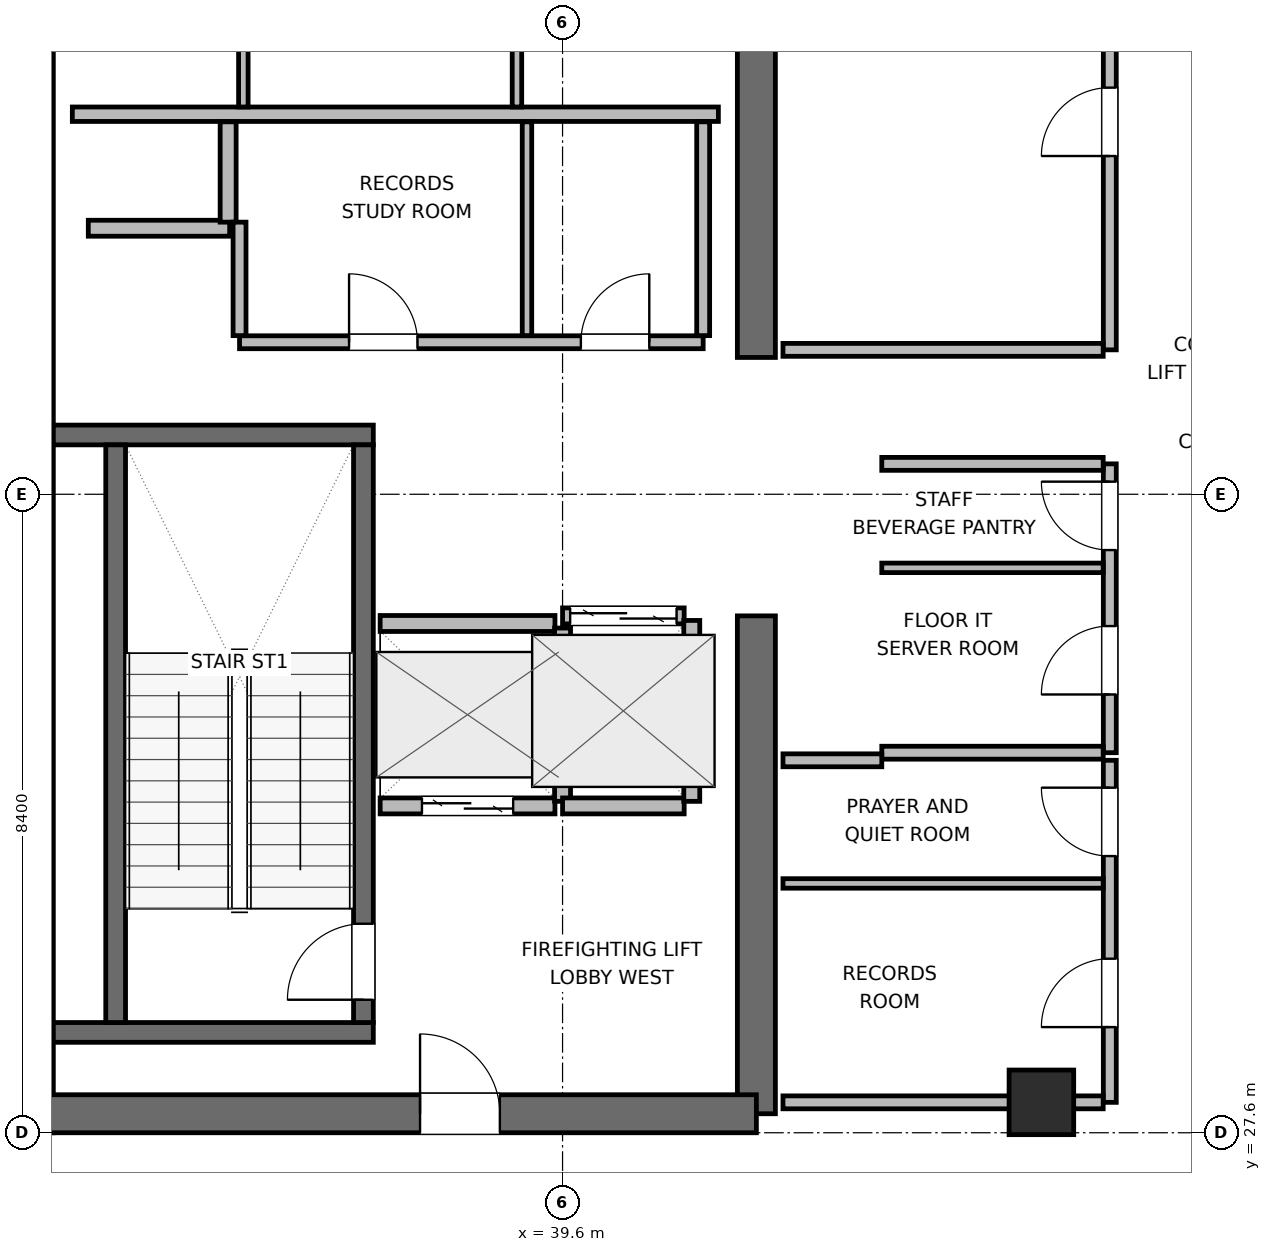
"""IFC4 building model, lengths in metres.
Left out: names, types, materials, properties, quantities, classifications, styles, units other than length and angle.
Written with IfcOpenShell. Run it as: python <this file> out.ifc"""

import sys

from ifc_helpers import new_model, si_unit, direction, frame, frame_2d, origin, origin_2d, place, context, subcontext, project, spatial, rectangle, extrude, element, fill, save


model = new_model("IFC4")
c1 = context("Model", 3, precision=1e-05, world=origin(), true_north=direction((0.0, 1.0)))
c2 = subcontext(c1, "Body", "Model", "MODEL_VIEW")
j1 = project(units=[si_unit("LENGTHUNIT", "METRE"), si_unit("PLANEANGLEUNIT", "RADIAN")], contexts=[c1])
p1 = place(None, origin())
s1 = spatial("IfcSite", under=j1, at=p1, CompositionType="ELEMENT")
p2 = place(p1, origin())
s2 = spatial("IfcBuilding", under=s1, at=p2, CompositionType="ELEMENT")
p3 = place(p2, frame((0.0, 0.0, 337.5)))
s3 = spatial("IfcBuildingStorey", under=s2, at=p3, CompositionType="ELEMENT", Elevation=337.5)
p4 = place(p3, frame((32.65, 27.6, 0.0), z_axis=(0.0, 0.0, 1.0), x_axis=(0.0, 1.0, 0.0)))
e1 = element("IfcWall", 1, at=p4, inside=s3, PredefinedType="SHEAR", context=c2, shape_type="SweptSolid", body=[
    extrude(rectangle(XDim=16.8, YDim=0.5, at=frame_2d((8.4, 0.0))), origin(), (0.0, 0.0, 1.0), 4.5),
])
p5 = place(p3, frame((42.15, 27.85, 0.0), z_axis=(0.0, 0.0, 1.0), x_axis=(0.0, 1.0, 0.0)))
e2 = element("IfcWall", 2, at=p5, inside=s3, PredefinedType="SHEAR", context=c2, shape_type="SweptSolid", body=[
    extrude(rectangle(XDim=6.55, YDim=0.5, at=frame_2d((3.275, 0.0))), origin(), (0.0, 0.0, 1.0), 4.5),
])
p6 = place(p3, frame((42.15, 37.8, 0.0), z_axis=(0.0, 0.0, 1.0), x_axis=(0.0, 1.0, 0.0)))
e3 = element("IfcWall", 3, at=p6, inside=s3, PredefinedType="SHEAR", context=c2, shape_type="SweptSolid", body=[
    extrude(rectangle(XDim=6.35, YDim=0.5, at=frame_2d((3.175, 0.0))), origin(), (0.0, 0.0, 1.0), 4.5),
])
p7 = place(p3, frame((32.65, 27.85, 0.0), z_axis=(0.0, 0.0, 1.0), x_axis=(1.0, 0.0, 0.0)))
e4 = element("IfcWall", 4, at=p7, inside=s3, PredefinedType="SHEAR", context=c2, shape_type="SweptSolid", body=[
    extrude(rectangle(XDim=9.5, YDim=0.5, at=frame_2d((4.75, 0.0))), origin(), (0.0, 0.0, 1.0), 4.5),
])
p8 = place(p7, frame((5.075, 0.0, 0.0)))
e5 = element("IfcOpeningElement", 5, at=p8, cuts=e4, PredefinedType="OPENING", context=c2, shape_type="SweptSolid", body=[
    extrude(rectangle(XDim=1.05, YDim=2.04, at=frame_2d((0.525, 1.02))), frame((0.0, 0.26, 0.0), z_axis=(0.0, -1.0, 0.0), x_axis=(1.0, 0.0, 0.0)), (0.0, 0.0, 1.0), 0.52),
])
for number, where, z_axis, x_axis in (
    (6, (32.9, 28.92, 0.0), (0.0, 0.0, 1.0), (1.0, 0.0, 0.0)),
    (7, (32.9, 36.78, 0.0), (0.0, 0.0, 1.0), (1.0, 0.0, 0.0)),
):
    element("IfcWall", number, at=place(p3, frame(where, z_axis=z_axis, x_axis=x_axis)), inside=s3, PredefinedType="SHEAR", context=c2, shape_type="SweptSolid", body=[
        extrude(rectangle(XDim=4.21, YDim=0.26, at=frame_2d((2.105, 0.0))), origin(), (0.0, 0.0, 1.0), 4.5),
    ])
p9 = place(p3, frame((33.72, 29.05, 0.0), z_axis=(0.0, 0.0, 1.0), x_axis=(0.0, 1.0, 0.0)))
e8 = element("IfcWall", 8, at=p9, inside=s3, PredefinedType="SHEAR", context=c2, shape_type="SweptSolid", body=[
    extrude(rectangle(XDim=7.6, YDim=0.26, at=frame_2d((3.8, 0.0))), origin(), (0.0, 0.0, 1.0), 4.5),
])
p10 = place(p3, frame((36.98, 29.05, 0.0), z_axis=(0.0, 0.0, 1.0), x_axis=(0.0, 1.0, 0.0)))
e9 = element("IfcWall", 9, at=p10, inside=s3, PredefinedType="SHEAR", context=c2, shape_type="SweptSolid", body=[
    extrude(rectangle(XDim=7.6, YDim=0.26, at=frame_2d((3.8, 0.0))), origin(), (0.0, 0.0, 1.0), 4.5),
])
p11 = place(p10, frame((0.3, 0.0, 0.0)))
e10 = element("IfcOpeningElement", 10, at=p11, cuts=e9, PredefinedType="OPENING", context=c2, shape_type="SweptSolid", body=[
    extrude(rectangle(XDim=1.0, YDim=2.04, at=frame_2d((0.5, 1.02))), frame((0.0, 0.14, 0.0), z_axis=(0.0, -1.0, 0.0), x_axis=(1.0, 0.0, 0.0)), (0.0, 0.0, 1.0), 0.28),
])
p12 = place(p3, frame((45.9, 28.0, 0.0), z_axis=(0.0, 0.0, 1.0), x_axis=(1.0, 0.0, 0.0)))
e11 = element("IfcColumn", 11, at=p12, inside=s3, PredefinedType="COLUMN", context=c2, shape_type="SweptSolid", body=[
    extrude(rectangle(XDim=0.85, YDim=0.85, at=origin_2d()), origin(), (0.0, 0.0, 1.0), 4.5),
])
p13 = place(p3, frame((33.15, 41.0, 0.0), z_axis=(0.0, 0.0, 1.0), x_axis=(1.0, 0.0, 0.0)))
e12 = element("IfcWall", 12, at=p13, inside=s3, PredefinedType="PLUMBINGWALL", context=c2, shape_type="SweptSolid", body=[
    extrude(rectangle(XDim=8.5, YDim=0.19, at=frame_2d((4.25, 0.0))), origin(), (0.0, 0.0, 1.0), 4.28),
])
for number, where, z_axis, x_axis in (
    (13, (35.4, 41.095, 0.0), (0.0, 0.0, 1.0), (0.0, 1.0, 0.0)),
    (14, (39.0, 41.095, 0.0), (0.0, 0.0, 1.0), (0.0, 1.0, 0.0)),
):
    element("IfcWall", number, at=place(p3, frame(where, z_axis=z_axis, x_axis=x_axis)), inside=s3, PredefinedType="PARTITIONING", context=c2, shape_type="SweptSolid", body=[
        extrude(rectangle(XDim=2.555, YDim=0.125, at=frame_2d((1.277, 0.0))), origin(), (0.0, 0.0, 1.0), 4.28),
    ])
p14 = place(p3, frame((33.36, 39.5, 0.0), z_axis=(0.0, 0.0, 1.0), x_axis=(1.0, 0.0, 0.0)))
e15 = element("IfcWall", 15, at=p14, inside=s3, PredefinedType="PARTITIONING", context=c2, shape_type="SweptSolid", body=[
    extrude(rectangle(XDim=1.86, YDim=0.21, at=frame_2d((0.93, 0.0))), origin(), (0.0, 0.0, 1.0), 4.28),
])
p15 = place(p3, frame((35.2, 39.58, 0.0), z_axis=(0.0, 0.0, 1.0), x_axis=(0.0, 1.0, 0.0)))
e16 = element("IfcWall", 16, at=p15, inside=s3, PredefinedType="PARTITIONING", context=c2, shape_type="SweptSolid", body=[
    extrude(rectangle(XDim=1.32, YDim=0.21, at=frame_2d((0.66, 0.0))), origin(), (0.0, 0.0, 1.0), 4.28),
])
p16 = place(p3, frame((37.2, 31.9, 0.0), z_axis=(0.0, 0.0, 1.0), x_axis=(1.0, 0.0, 0.0)))
e17 = element("IfcWall", 17, at=p16, inside=s3, PredefinedType="PARTITIONING", context=c2, shape_type="SweptSolid", body=[
    extrude(rectangle(XDim=2.3, YDim=0.21, at=frame_2d((1.15, 0.0))), origin(), (0.0, 0.0, 1.0), 4.28),
])
p17 = place(p16, frame((0.55, 0.0, 0.0)))
e18 = element("IfcOpeningElement", 18, at=p17, cuts=e17, PredefinedType="OPENING", context=c2, shape_type="SweptSolid", body=[
    extrude(rectangle(XDim=1.2, YDim=2.04, at=frame_2d((0.6, 1.02))), frame((0.0, 0.115, 0.0), z_axis=(0.0, -1.0, 0.0), x_axis=(1.0, 0.0, 0.0)), (0.0, 0.0, 1.0), 0.23),
])
p18 = place(p3, frame((37.2, 34.3, 0.0), z_axis=(0.0, 0.0, 1.0), x_axis=(1.0, 0.0, 0.0)))
e19 = element("IfcWall", 19, at=p18, inside=s3, PredefinedType="PARTITIONING", context=c2, shape_type="SweptSolid", body=[
    extrude(rectangle(XDim=2.3, YDim=0.21, at=frame_2d((1.15, 0.0))), origin(), (0.0, 0.0, 1.0), 4.28),
])
p19 = place(p3, frame((39.6, 31.96, 0.0), z_axis=(0.0, 0.0, 1.0), x_axis=(0.0, 1.0, 0.0)))
e20 = element("IfcWall", 20, at=p19, inside=s3, PredefinedType="PARTITIONING", context=c2, shape_type="SweptSolid", body=[
    extrude(rectangle(XDim=2.28, YDim=0.21, at=frame_2d((1.14, 0.0))), origin(), (0.0, 0.0, 1.0), 4.28),
])
p20 = place(p3, frame((39.6, 34.4, 0.0), z_axis=(0.0, 0.0, 1.0), x_axis=(1.0, 0.0, 0.0)))
e21 = element("IfcWall", 21, at=p20, inside=s3, PredefinedType="PARTITIONING", context=c2, shape_type="SweptSolid", body=[
    extrude(rectangle(XDim=1.6, YDim=0.21, at=frame_2d((0.8, 0.0))), origin(), (0.0, 0.0, 1.0), 4.28),
])
p21 = place(p20, frame((0.1, 0.0, 0.0)))
e22 = element("IfcOpeningElement", 22, at=p21, cuts=e21, PredefinedType="OPENING", context=c2, shape_type="SweptSolid", body=[
    extrude(rectangle(XDim=1.4, YDim=2.06, at=frame_2d((0.7, 1.03))), frame((0.0, 0.115, 0.0), z_axis=(0.0, -1.0, 0.0), x_axis=(1.0, 0.0, 0.0)), (0.0, 0.0, 1.0), 0.23),
])
p22 = place(p3, frame((39.6, 31.9, 0.0), z_axis=(0.0, 0.0, 1.0), x_axis=(1.0, 0.0, 0.0)))
e23 = element("IfcWall", 23, at=p22, inside=s3, PredefinedType="PARTITIONING", context=c2, shape_type="SweptSolid", body=[
    extrude(rectangle(XDim=1.6, YDim=0.21, at=frame_2d((0.8, 0.0))), origin(), (0.0, 0.0, 1.0), 4.28),
])
p23 = place(p3, frame((41.3, 31.96, 0.0), z_axis=(0.0, 0.0, 1.0), x_axis=(0.0, 1.0, 0.0)))
e24 = element("IfcWall", 24, at=p23, inside=s3, PredefinedType="PARTITIONING", context=c2, shape_type="SweptSolid", body=[
    extrude(rectangle(XDim=2.38, YDim=0.21, at=frame_2d((1.19, 0.0))), origin(), (0.0, 0.0, 1.0), 4.28),
])
p24 = place(p3, frame((35.35, 38.0, 0.0), z_axis=(0.0, 0.0, 1.0), x_axis=(1.0, 0.0, 0.0)))
e25 = element("IfcWall", 25, at=p24, inside=s3, PredefinedType="PARTITIONING", context=c2, shape_type="SweptSolid", body=[
    extrude(rectangle(XDim=6.1, YDim=0.17, at=frame_2d((3.05, 0.0))), origin(), (0.0, 0.0, 1.0), 4.28),
])
p25 = place(p24, frame((1.441, 0.0, 0.0)))
e26 = element("IfcOpeningElement", 26, at=p25, cuts=e25, PredefinedType="OPENING", context=c2, shape_type="SweptSolid", body=[
    extrude(rectangle(XDim=0.9, YDim=2.02, at=frame_2d((0.45, 1.01))), frame((0.0, 0.095, 0.0), z_axis=(0.0, -1.0, 0.0), x_axis=(1.0, 0.0, 0.0)), (0.0, 0.0, 1.0), 0.19),
])
p26 = place(p24, frame((4.491, 0.0, 0.0)))
e27 = element("IfcOpeningElement", 27, at=p26, cuts=e25, PredefinedType="OPENING", context=c2, shape_type="SweptSolid", body=[
    extrude(rectangle(XDim=0.9, YDim=2.02, at=frame_2d((0.45, 1.01))), frame((0.0, 0.095, 0.0), z_axis=(0.0, -1.0, 0.0), x_axis=(1.0, 0.0, 0.0)), (0.0, 0.0, 1.0), 0.19),
])
p27 = place(p3, frame((35.35, 38.087, 0.0), z_axis=(0.0, 0.0, 1.0), x_axis=(0.0, 1.0, 0.0)))
e28 = element("IfcWall", 28, at=p27, inside=s3, PredefinedType="PARTITIONING", context=c2, shape_type="SweptSolid", body=[
    extrude(rectangle(XDim=1.493, YDim=0.17, at=frame_2d((0.747, 0.0))), origin(), (0.0, 0.0, 1.0), 4.28),
])
p28 = place(p3, frame((41.45, 38.087, 0.0), z_axis=(0.0, 0.0, 1.0), x_axis=(0.0, 1.0, 0.0)))
e29 = element("IfcWall", 29, at=p28, inside=s3, PredefinedType="PARTITIONING", context=c2, shape_type="SweptSolid", body=[
    extrude(rectangle(XDim=2.813, YDim=0.17, at=frame_2d((1.406, 0.0))), origin(), (0.0, 0.0, 1.0), 4.28),
])
p29 = place(p3, frame((39.132, 38.087, 0.0), z_axis=(0.0, 0.0, 1.0), x_axis=(0.0, 1.0, 0.0)))
e30 = element("IfcWall", 30, at=p29, inside=s3, PredefinedType="PARTITIONING", context=c2, shape_type="SweptSolid", body=[
    extrude(rectangle(XDim=2.813, YDim=0.125, at=frame_2d((1.406, 0.0))), origin(), (0.0, 0.0, 1.0), 4.28),
])
p30 = place(p3, frame((46.8, 32.6, 0.0), z_axis=(0.0, 0.0, 1.0), x_axis=(0.0, 1.0, 0.0)))
e31 = element("IfcWall", 31, at=p30, inside=s3, PredefinedType="PARTITIONING", context=c2, shape_type="SweptSolid", body=[
    extrude(rectangle(XDim=3.8, YDim=0.17, at=frame_2d((1.9, 0.0))), origin(), (0.0, 0.0, 1.0), 4.28),
])
p31 = place(p30, frame((0.766, 0.0, 0.0)))
e32 = element("IfcOpeningElement", 32, at=p31, cuts=e31, PredefinedType="OPENING", context=c2, shape_type="SweptSolid", body=[
    extrude(rectangle(XDim=0.9, YDim=2.02, at=frame_2d((0.45, 1.01))), frame((0.0, 0.095, 0.0), z_axis=(0.0, -1.0, 0.0), x_axis=(1.0, 0.0, 0.0)), (0.0, 0.0, 1.0), 0.19),
])
p32 = place(p30, frame((2.666, 0.0, 0.0)))
e33 = element("IfcOpeningElement", 33, at=p32, cuts=e31, PredefinedType="OPENING", context=c2, shape_type="SweptSolid", body=[
    extrude(rectangle(XDim=0.9, YDim=2.02, at=frame_2d((0.45, 1.01))), frame((0.0, 0.095, 0.0), z_axis=(0.0, -1.0, 0.0), x_axis=(1.0, 0.0, 0.0)), (0.0, 0.0, 1.0), 0.19),
])
for number, where, z_axis, x_axis in (
    (34, (43.8, 32.6, 0.0), (0.0, 0.0, 1.0), (1.0, 0.0, 0.0)),
    (35, (43.8, 36.4, 0.0), (0.0, 0.0, 1.0), (1.0, 0.0, 0.0)),
):
    element("IfcWall", number, at=place(p3, frame(where, z_axis=z_axis, x_axis=x_axis)), inside=s3, PredefinedType="PARTITIONING", context=c2, shape_type="SweptSolid", body=[
        extrude(rectangle(XDim=2.913, YDim=0.17, at=frame_2d((1.457, 0.0))), origin(), (0.0, 0.0, 1.0), 4.28),
    ])
p33 = place(p3, frame((43.8, 35.032, 0.0), z_axis=(0.0, 0.0, 1.0), x_axis=(1.0, 0.0, 0.0)))
e36 = element("IfcWall", 36, at=p33, inside=s3, PredefinedType="PARTITIONING", context=c2, shape_type="SweptSolid", body=[
    extrude(rectangle(XDim=2.913, YDim=0.125, at=frame_2d((1.457, 0.0))), origin(), (0.0, 0.0, 1.0), 4.28),
])
p34 = place(p3, frame((46.8, 28.0, 0.0), z_axis=(0.0, 0.0, 1.0), x_axis=(0.0, 1.0, 0.0)))
e37 = element("IfcWall", 37, at=p34, inside=s3, PredefinedType="PARTITIONING", context=c2, shape_type="SweptSolid", body=[
    extrude(rectangle(XDim=4.5, YDim=0.17, at=frame_2d((2.25, 0.0))), origin(), (0.0, 0.0, 1.0), 4.28),
])
p35 = place(p34, frame((0.99, 0.0, 0.0)))
e38 = element("IfcOpeningElement", 38, at=p35, cuts=e37, PredefinedType="OPENING", context=c2, shape_type="SweptSolid", body=[
    extrude(rectangle(XDim=0.9, YDim=2.02, at=frame_2d((0.45, 1.01))), frame((0.0, 0.095, 0.0), z_axis=(0.0, -1.0, 0.0), x_axis=(1.0, 0.0, 0.0)), (0.0, 0.0, 1.0), 0.19),
])
p36 = place(p34, frame((3.24, 0.0, 0.0)))
e39 = element("IfcOpeningElement", 39, at=p36, cuts=e37, PredefinedType="OPENING", context=c2, shape_type="SweptSolid", body=[
    extrude(rectangle(XDim=0.9, YDim=2.02, at=frame_2d((0.45, 1.01))), frame((0.0, 0.095, 0.0), z_axis=(0.0, -1.0, 0.0), x_axis=(1.0, 0.0, 0.0)), (0.0, 0.0, 1.0), 0.19),
])
p37 = place(p3, frame((42.5, 28.0, 0.0), z_axis=(0.0, 0.0, 1.0), x_axis=(1.0, 0.0, 0.0)))
e40 = element("IfcWall", 40, at=p37, inside=s3, PredefinedType="PARTITIONING", context=c2, shape_type="SweptSolid", body=[
    extrude(rectangle(XDim=4.213, YDim=0.17, at=frame_2d((2.106, 0.0))), origin(), (0.0, 0.0, 1.0), 3.365),
])
p38 = place(p3, frame((42.5, 32.5, 0.0), z_axis=(0.0, 0.0, 1.0), x_axis=(1.0, 0.0, 0.0)))
e41 = element("IfcWall", 41, at=p38, inside=s3, PredefinedType="PARTITIONING", context=c2, shape_type="SweptSolid", body=[
    extrude(rectangle(XDim=1.3, YDim=0.17, at=frame_2d((0.65, 0.0))), origin(), (0.0, 0.0, 1.0), 4.28),
])
p39 = place(p3, frame((42.5, 30.88, 0.0), z_axis=(0.0, 0.0, 1.0), x_axis=(1.0, 0.0, 0.0)))
e42 = element("IfcWall", 42, at=p39, inside=s3, PredefinedType="PARTITIONING", context=c2, shape_type="SweptSolid", body=[
    extrude(rectangle(XDim=4.213, YDim=0.125, at=frame_2d((2.106, 0.0))), origin(), (0.0, 0.0, 1.0), 4.28),
])
p40 = place(p3, frame((46.8, 37.9, 0.0), z_axis=(0.0, 0.0, 1.0), x_axis=(0.0, 1.0, 0.0)))
e43 = element("IfcWall", 43, at=p40, inside=s3, PredefinedType="PARTITIONING", context=c2, shape_type="SweptSolid", body=[
    extrude(rectangle(XDim=6.0, YDim=0.17, at=frame_2d((3.0, 0.0))), origin(), (0.0, 0.0, 1.0), 4.28),
])
p41 = place(p40, frame((2.55, 0.0, 0.0)))
e44 = element("IfcOpeningElement", 44, at=p41, cuts=e43, PredefinedType="OPENING", context=c2, shape_type="SweptSolid", body=[
    extrude(rectangle(XDim=0.9, YDim=2.02, at=frame_2d((0.45, 1.01))), frame((0.0, 0.095, 0.0), z_axis=(0.0, -1.0, 0.0), x_axis=(1.0, 0.0, 0.0)), (0.0, 0.0, 1.0), 0.19),
])
p42 = place(p3, frame((42.5, 37.9, 0.0), z_axis=(0.0, 0.0, 1.0), x_axis=(1.0, 0.0, 0.0)))
e45 = element("IfcWall", 45, at=p42, inside=s3, PredefinedType="PARTITIONING", context=c2, shape_type="SweptSolid", body=[
    extrude(rectangle(XDim=4.213, YDim=0.17, at=frame_2d((2.106, 0.0))), origin(), (0.0, 0.0, 1.0), 4.28),
])
p43 = place(p11, origin())
e46 = element("IfcDoor", 46, at=p43, inside=s3, OperationType="SINGLE_SWING_LEFT", PredefinedType="DOOR", context=c2, shape_type="SweptSolid", body=[
    extrude(rectangle(XDim=1.0, YDim=2.04, at=frame_2d((0.5, 1.02))), frame((0.0, 0.025, 0.0), z_axis=(0.0, -1.0, 0.0), x_axis=(1.0, 0.0, 0.0)), (0.0, 0.0, 1.0), 0.05),
])
fill(e10, e46)
p44 = place(p17, origin())
e47 = element("IfcDoor", 47, at=p44, inside=s3, OperationType="DOUBLE_DOOR_SLIDING", PredefinedType="DOOR", context=c2, shape_type="SweptSolid", body=[
    extrude(rectangle(XDim=1.2, YDim=2.04, at=frame_2d((0.6, 1.02))), frame((0.0, 0.025, 0.0), z_axis=(0.0, -1.0, 0.0), x_axis=(1.0, 0.0, 0.0)), (0.0, 0.0, 1.0), 0.05),
])
fill(e18, e47)
p45 = place(p21, origin())
e48 = element("IfcDoor", 48, at=p45, inside=s3, OperationType="DOUBLE_DOOR_SLIDING", PredefinedType="DOOR", context=c2, shape_type="SweptSolid", body=[
    extrude(rectangle(XDim=1.4, YDim=2.06, at=frame_2d((0.7, 1.03))), frame((0.0, 0.025, 0.0), z_axis=(0.0, -1.0, 0.0), x_axis=(1.0, 0.0, 0.0)), (0.0, 0.0, 1.0), 0.05),
])
fill(e22, e48)
p46 = place(p8, origin())
e49 = element("IfcDoor", 49, at=p46, inside=s3, OperationType="SINGLE_SWING_LEFT", PredefinedType="DOOR", context=c2, shape_type="SweptSolid", body=[
    extrude(rectangle(XDim=1.05, YDim=2.04, at=frame_2d((0.525, 1.02))), frame((0.0, 0.025, 0.0), z_axis=(0.0, -1.0, 0.0), x_axis=(1.0, 0.0, 0.0)), (0.0, 0.0, 1.0), 0.05),
])
fill(e5, e49)
p47 = place(p25, origin())
e50 = element("IfcDoor", 50, at=p47, inside=s3, OperationType="SINGLE_SWING_LEFT", PredefinedType="DOOR", context=c2, shape_type="SweptSolid", body=[
    extrude(rectangle(XDim=0.9, YDim=2.02, at=frame_2d((0.45, 1.01))), frame((0.0, 0.025, 0.0), z_axis=(0.0, -1.0, 0.0), x_axis=(1.0, 0.0, 0.0)), (0.0, 0.0, 1.0), 0.05),
])
fill(e26, e50)
p48 = place(p26, origin())
e51 = element("IfcDoor", 51, at=p48, inside=s3, OperationType="SINGLE_SWING_RIGHT", PredefinedType="DOOR", context=c2, shape_type="SweptSolid", body=[
    extrude(rectangle(XDim=0.9, YDim=2.02, at=frame_2d((0.45, 1.01))), frame((0.0, 0.025, 0.0), z_axis=(0.0, -1.0, 0.0), x_axis=(1.0, 0.0, 0.0)), (0.0, 0.0, 1.0), 0.05),
])
fill(e27, e51)
p49 = place(p31, origin())
e52 = element("IfcDoor", 52, at=p49, inside=s3, OperationType="SINGLE_SWING_LEFT", PredefinedType="DOOR", context=c2, shape_type="SweptSolid", body=[
    extrude(rectangle(XDim=0.9, YDim=2.02, at=frame_2d((0.45, 1.01))), frame((0.0, 0.025, 0.0), z_axis=(0.0, -1.0, 0.0), x_axis=(1.0, 0.0, 0.0)), (0.0, 0.0, 1.0), 0.05),
])
fill(e32, e52)
p50 = place(p32, origin())
e53 = element("IfcDoor", 53, at=p50, inside=s3, OperationType="SINGLE_SWING_RIGHT", PredefinedType="DOOR", context=c2, shape_type="SweptSolid", body=[
    extrude(rectangle(XDim=0.9, YDim=2.02, at=frame_2d((0.45, 1.01))), frame((0.0, 0.025, 0.0), z_axis=(0.0, -1.0, 0.0), x_axis=(1.0, 0.0, 0.0)), (0.0, 0.0, 1.0), 0.05),
])
fill(e33, e53)
p51 = place(p35, origin())
e54 = element("IfcDoor", 54, at=p51, inside=s3, OperationType="SINGLE_SWING_LEFT", PredefinedType="DOOR", context=c2, shape_type="SweptSolid", body=[
    extrude(rectangle(XDim=0.9, YDim=2.02, at=frame_2d((0.45, 1.01))), frame((0.0, 0.025, 0.0), z_axis=(0.0, -1.0, 0.0), x_axis=(1.0, 0.0, 0.0)), (0.0, 0.0, 1.0), 0.05),
])
fill(e38, e54)
p52 = place(p36, origin())
e55 = element("IfcDoor", 55, at=p52, inside=s3, OperationType="SINGLE_SWING_RIGHT", PredefinedType="DOOR", context=c2, shape_type="SweptSolid", body=[
    extrude(rectangle(XDim=0.9, YDim=2.02, at=frame_2d((0.45, 1.01))), frame((0.0, 0.025, 0.0), z_axis=(0.0, -1.0, 0.0), x_axis=(1.0, 0.0, 0.0)), (0.0, 0.0, 1.0), 0.05),
])
fill(e39, e55)
p53 = place(p41, origin())
e56 = element("IfcDoor", 56, at=p53, inside=s3, OperationType="SINGLE_SWING_LEFT", PredefinedType="DOOR", context=c2, shape_type="SweptSolid", body=[
    extrude(rectangle(XDim=0.9, YDim=2.02, at=frame_2d((0.45, 1.01))), frame((0.0, 0.025, 0.0), z_axis=(0.0, -1.0, 0.0), x_axis=(1.0, 0.0, 0.0)), (0.0, 0.0, 1.0), 0.05),
])
fill(e44, e56)
save(model, sys.argv[1])
